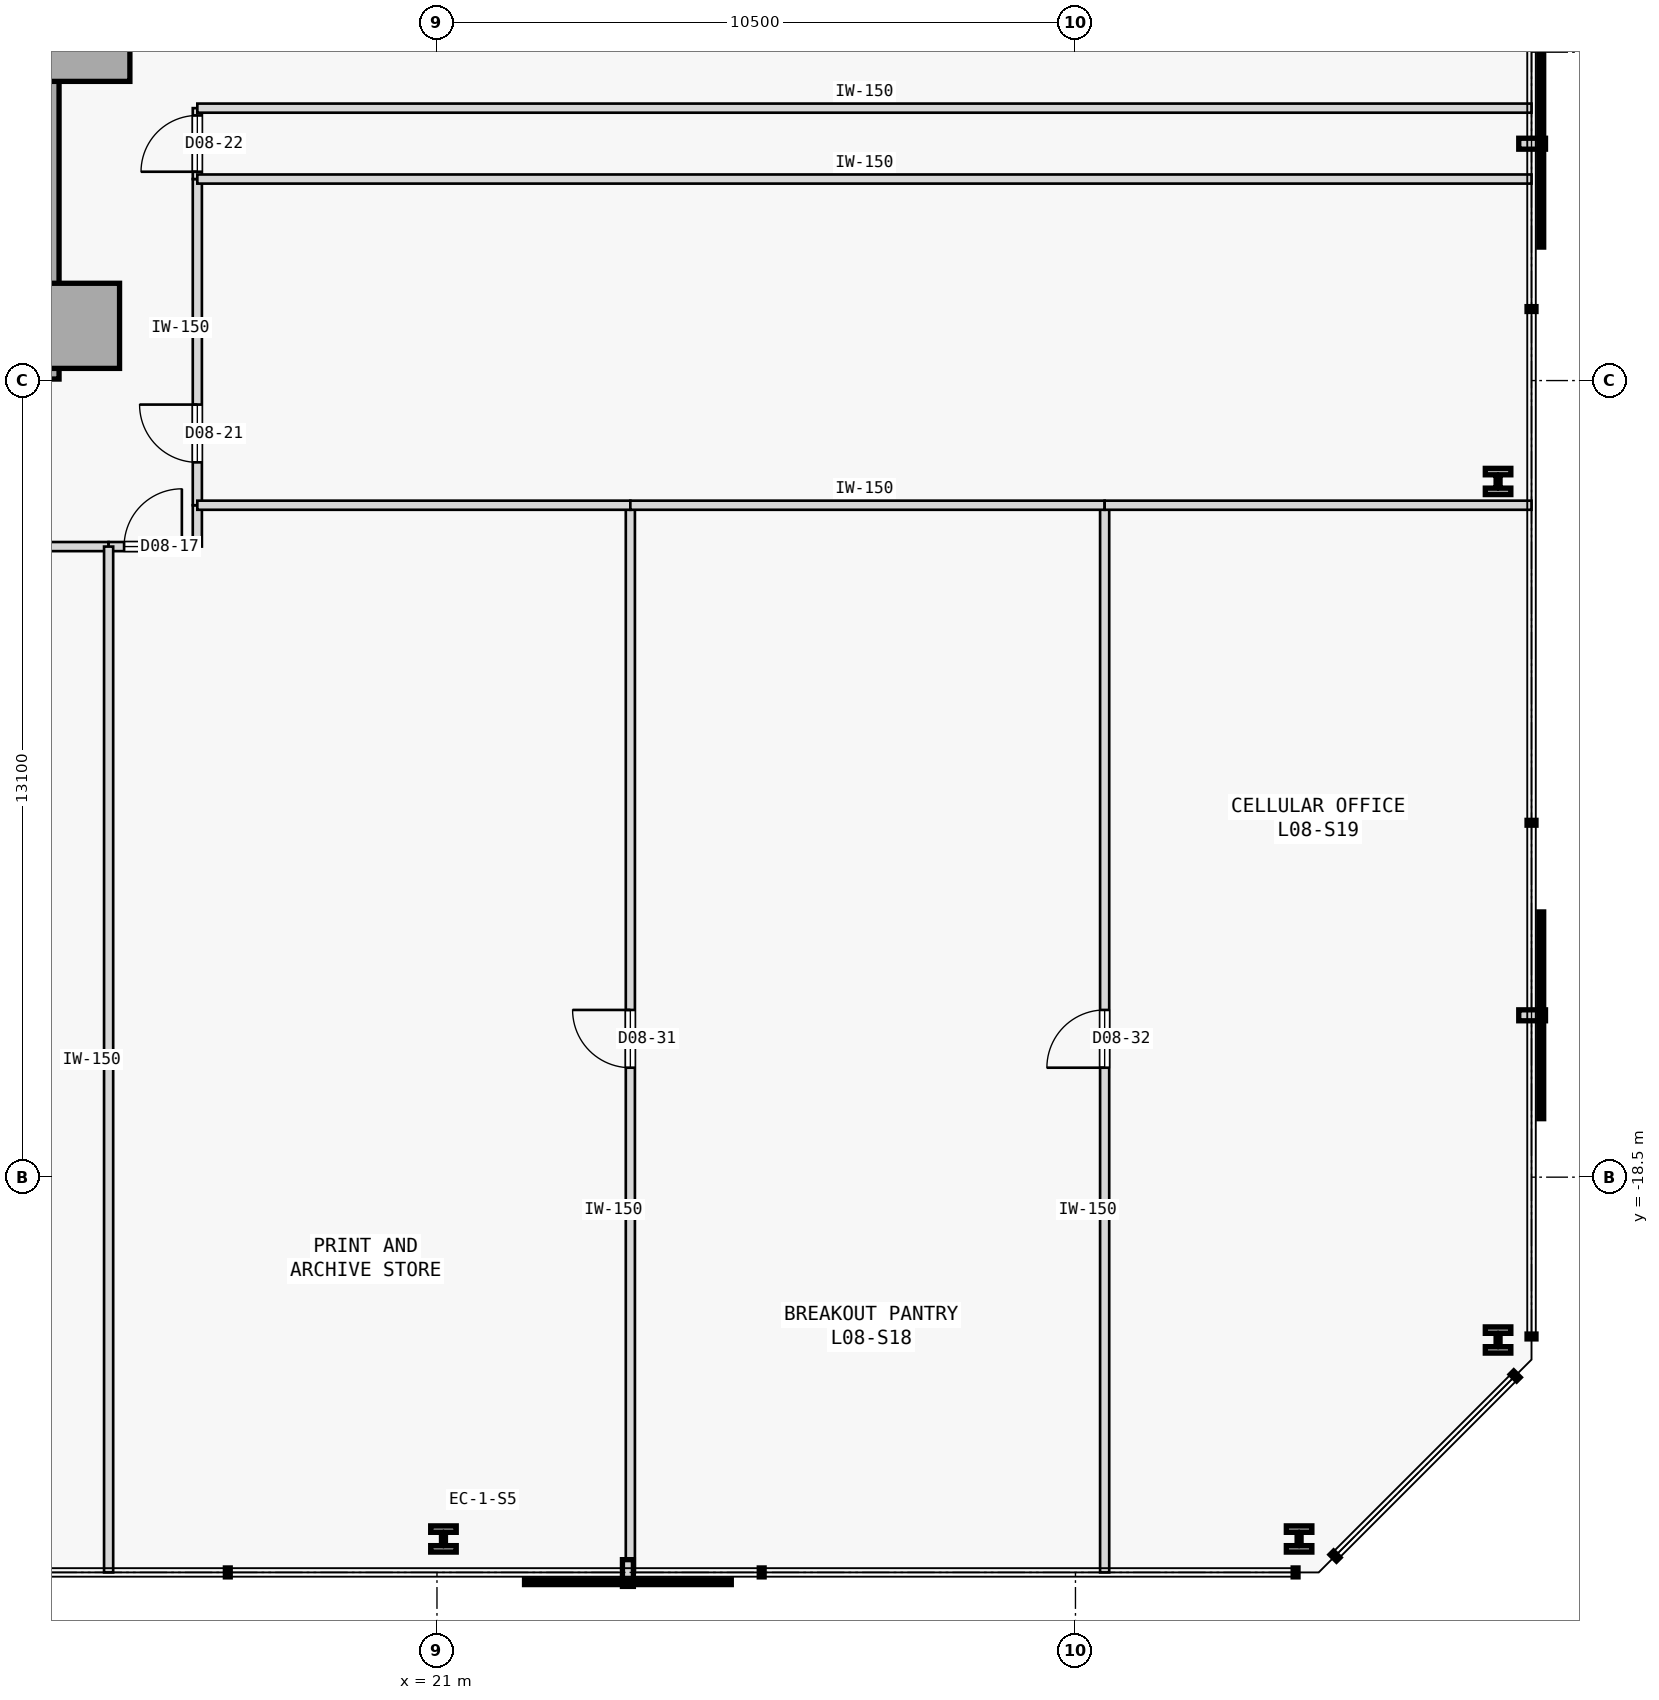
"""IFC4 building model, lengths in metres.
Left out: names, types, materials, properties, quantities, classifications, styles, units other than length and angle.
Written with IfcOpenShell. Run it as: python <this file> out.ifc"""

import sys

from ifc_helpers import new_model, si_unit, direction, frame, frame_2d, origin, origin_2d, place, context, subcontext, project, spatial, rectangle, i_section, extrude, element, fill, save


model = new_model("IFC4")
c1 = context("Model", 3, precision=1e-05, world=origin(), true_north=direction((0.0, 1.0)))
c2 = subcontext(c1, "Body", "Model", "MODEL_VIEW")
j1 = project(units=[si_unit("LENGTHUNIT", "METRE"), si_unit("PLANEANGLEUNIT", "RADIAN")], contexts=[c1])
p1 = place(None, origin())
s1 = spatial("IfcSite", under=j1, at=p1, CompositionType="ELEMENT")
p2 = place(p1, origin())
s2 = spatial("IfcBuilding", under=s1, at=p2, CompositionType="ELEMENT")
p3 = place(p2, frame((0.0, 0.0, 37.0)))
s3 = spatial("IfcBuildingStorey", under=s2, at=p3, CompositionType="ELEMENT", Elevation=37.0)
for number, where, z_axis, x_axis in (
    (1, (15.25, 0.22, 0.0), (0.0, 0.0, 1.0), (1.0, 0.0, 0.0)),
    (2, (15.08, -4.5, 0.0), (0.0, 0.0, 1.0), (1.0, 0.0, 0.0)),
):
    element("IfcColumn", number, at=place(p3, frame(where, z_axis=z_axis, x_axis=x_axis)), inside=s3, PredefinedType="COLUMN", context=c2, shape_type="SweptSolid", body=[
        extrude(rectangle(XDim=1.4, YDim=1.4, at=origin_2d()), origin(), (0.0, 0.0, 1.0), 3.8),
    ])
p4 = place(p3, frame((14.56, -5.375, 0.0), z_axis=(0.0, 0.0, 1.0), x_axis=(0.0, 1.0, 0.0)))
e3 = element("IfcWall", 3, at=p4, inside=s3, PredefinedType="SHEAR", context=c2, shape_type="SweptSolid", body=[
    extrude(rectangle(XDim=10.75, YDim=0.45, at=frame_2d((5.375, 0.0))), origin(), (0.0, 0.0, 1.0), 3.575),
])
for number, where, z_axis, x_axis in (
    (4, (21.107, -24.45, 0.0), (0.0, 0.0, 1.0), (1.0, 0.0, 0.0)),
    (5, (35.178, -24.45, 0.0), (0.0, 0.0, 1.0), (1.0, 0.0, 0.0)),
    (6, (38.45, -21.178, 0.0), (0.0, 0.0, 1.0), (1.0, 0.0, 0.0)),
    (7, (38.45, -7.059, 0.0), (0.0, 0.0, 1.0), (1.0, 0.0, 0.0)),
):
    element("IfcColumn", number, at=place(p3, frame(where, z_axis=z_axis, x_axis=x_axis)), inside=s3, PredefinedType="COLUMN", context=c2, shape_type="SweptSolid", body=[
        extrude(i_section(OverallWidth=0.42, OverallDepth=0.431, WebThickness=0.065, FlangeThickness=0.106, FilletRadius=0.015, at=origin_2d()), origin(), (0.0, 0.0, 1.0), 3.8),
    ])
p5 = place(p3, frame((6.24, -8.13, 0.0), z_axis=(0.0, 0.0, 1.0), x_axis=(1.0, 0.0, 0.0)))
e8 = element("IfcWall", 8, at=p5, inside=s3, PredefinedType="PARTITIONING", context=c2, shape_type="SweptSolid", body=[
    extrude(rectangle(XDim=9.36, YDim=0.15, at=frame_2d((4.68, 0.0))), origin(), (0.0, 0.0, 1.0), 3.575),
])
p6 = place(p5, frame((5.609, 0.0, 0.0)))
e9 = element("IfcOpeningElement", 9, at=p6, cuts=e8, PredefinedType="OPENING", context=c2, shape_type="SweptSolid", body=[
    extrude(rectangle(XDim=0.95, YDim=2.15, at=frame_2d((0.475, 1.075))), frame((0.0, 0.085, 0.0), z_axis=(0.0, -1.0, 0.0), x_axis=(1.0, 0.0, 0.0)), (0.0, 0.0, 1.0), 0.17),
])
p7 = place(p3, frame((15.6, -8.13, 0.0), z_axis=(0.0, 0.0, 1.0), x_axis=(1.0, 0.0, 0.0)))
e10 = element("IfcWall", 10, at=p7, inside=s3, PredefinedType="PARTITIONING", context=c2, shape_type="SweptSolid", body=[
    extrude(rectangle(XDim=1.459, YDim=0.15, at=frame_2d((0.729, 0.0))), origin(), (0.0, 0.0, 1.0), 3.575),
])
p8 = place(p7, frame((0.254, 0.0, 0.0)))
e11 = element("IfcOpeningElement", 11, at=p8, cuts=e10, PredefinedType="OPENING", context=c2, shape_type="SweptSolid", body=[
    extrude(rectangle(XDim=0.95, YDim=2.15, at=frame_2d((0.475, 1.075))), frame((0.0, 0.085, 0.0), z_axis=(0.0, -1.0, 0.0), x_axis=(1.0, 0.0, 0.0)), (0.0, 0.0, 1.0), 0.17),
])
p9 = place(p3, frame((17.059, -8.13, 0.0), z_axis=(0.0, 0.0, 1.0), x_axis=(0.0, 1.0, 0.0)))
e12 = element("IfcWall", 12, at=p9, inside=s3, PredefinedType="PARTITIONING", context=c2, shape_type="SweptSolid", body=[
    extrude(rectangle(XDim=0.68, YDim=0.15, at=frame_2d((0.34, 0.0))), origin(), (0.0, 0.0, 1.0), 3.575),
])
p10 = place(p3, frame((17.059, -7.45, 0.0), z_axis=(0.0, 0.0, 1.0), x_axis=(0.0, 1.0, 0.0)))
e13 = element("IfcWall", 13, at=p10, inside=s3, PredefinedType="PARTITIONING", context=c2, shape_type="SweptSolid", body=[
    extrude(rectangle(XDim=5.364, YDim=0.15, at=frame_2d((2.682, 0.0))), origin(), (0.0, 0.0, 1.0), 3.575),
])
p11 = place(p10, frame((0.705, 0.0, 0.0)))
e14 = element("IfcOpeningElement", 14, at=p11, cuts=e13, PredefinedType="OPENING", context=c2, shape_type="SweptSolid", body=[
    extrude(rectangle(XDim=0.95, YDim=2.15, at=frame_2d((0.475, 1.075))), frame((0.0, 0.085, 0.0), z_axis=(0.0, -1.0, 0.0), x_axis=(1.0, 0.0, 0.0)), (0.0, 0.0, 1.0), 0.17),
])
p12 = place(p3, frame((17.059, -2.086, 0.0), z_axis=(0.0, 0.0, 1.0), x_axis=(0.0, 1.0, 0.0)))
e15 = element("IfcWall", 15, at=p12, inside=s3, PredefinedType="PARTITIONING", context=c2, shape_type="SweptSolid", body=[
    extrude(rectangle(XDim=1.166, YDim=0.15, at=frame_2d((0.583, 0.0))), origin(), (0.0, 0.0, 1.0), 3.575),
])
p13 = place(p12, frame((0.12, 0.0, 0.0)))
e16 = element("IfcOpeningElement", 16, at=p13, cuts=e15, PredefinedType="OPENING", context=c2, shape_type="SweptSolid", body=[
    extrude(rectangle(XDim=0.926, YDim=2.15, at=frame_2d((0.463, 1.075))), frame((0.0, 0.085, 0.0), z_axis=(0.0, -1.0, 0.0), x_axis=(1.0, 0.0, 0.0)), (0.0, 0.0, 1.0), 0.17),
])
p14 = place(p3, frame((17.059, -0.92, 0.0), z_axis=(0.0, 0.0, 1.0), x_axis=(1.0, 0.0, 0.0)))
e17 = element("IfcWall", 17, at=p14, inside=s3, PredefinedType="PARTITIONING", context=c2, shape_type="SweptSolid", body=[
    extrude(rectangle(XDim=21.941, YDim=0.15, at=frame_2d((10.97, 0.0))), origin(), (0.0, 0.0, 1.0), 3.575),
])
p15 = place(p3, frame((15.6, -25.0, 0.0), z_axis=(0.0, 0.0, 1.0), x_axis=(0.0, 1.0, 0.0)))
e18 = element("IfcWall", 18, at=p15, inside=s3, PredefinedType="PARTITIONING", context=c2, shape_type="SweptSolid", body=[
    extrude(rectangle(XDim=16.87, YDim=0.15, at=frame_2d((8.435, 0.0))), origin(), (0.0, 0.0, 1.0), 3.575),
])
p16 = place(p3, frame((24.18, -25.0, 0.0), z_axis=(0.0, 0.0, 1.0), x_axis=(0.0, 1.0, 0.0)))
e19 = element("IfcWall", 19, at=p16, inside=s3, PredefinedType="PARTITIONING", context=c2, shape_type="SweptSolid", body=[
    extrude(rectangle(XDim=17.55, YDim=0.15, at=frame_2d((8.775, 0.0))), origin(), (0.0, 0.0, 1.0), 3.575),
])
p17 = place(p16, frame((8.3, 0.0, 0.0)))
e20 = element("IfcOpeningElement", 20, at=p17, cuts=e19, PredefinedType="OPENING", context=c2, shape_type="SweptSolid", body=[
    extrude(rectangle(XDim=0.95, YDim=2.15, at=frame_2d((0.475, 1.075))), frame((0.0, 0.085, 0.0), z_axis=(0.0, -1.0, 0.0), x_axis=(1.0, 0.0, 0.0)), (0.0, 0.0, 1.0), 0.17),
])
p18 = place(p3, frame((17.059, -7.45, 0.0), z_axis=(0.0, 0.0, 1.0), x_axis=(1.0, 0.0, 0.0)))
e21 = element("IfcWall", 21, at=p18, inside=s3, PredefinedType="PARTITIONING", context=c2, shape_type="SweptSolid", body=[
    extrude(rectangle(XDim=7.121, YDim=0.15, at=frame_2d((3.561, 0.0))), origin(), (0.0, 0.0, 1.0), 3.575),
])
p19 = place(p3, frame((31.98, -25.0, 0.0), z_axis=(0.0, 0.0, 1.0), x_axis=(0.0, 1.0, 0.0)))
e22 = element("IfcWall", 22, at=p19, inside=s3, PredefinedType="PARTITIONING", context=c2, shape_type="SweptSolid", body=[
    extrude(rectangle(XDim=17.55, YDim=0.15, at=frame_2d((8.775, 0.0))), origin(), (0.0, 0.0, 1.0), 3.575),
])
p20 = place(p19, frame((8.3, 0.0, 0.0)))
e23 = element("IfcOpeningElement", 23, at=p20, cuts=e22, PredefinedType="OPENING", context=c2, shape_type="SweptSolid", body=[
    extrude(rectangle(XDim=0.95, YDim=2.15, at=frame_2d((0.475, 1.075))), frame((0.0, 0.085, 0.0), z_axis=(0.0, -1.0, 0.0), x_axis=(1.0, 0.0, 0.0)), (0.0, 0.0, 1.0), 0.17),
])
p21 = place(p3, frame((24.18, -7.45, 0.0), z_axis=(0.0, 0.0, 1.0), x_axis=(1.0, 0.0, 0.0)))
e24 = element("IfcWall", 24, at=p21, inside=s3, PredefinedType="PARTITIONING", context=c2, shape_type="SweptSolid", body=[
    extrude(rectangle(XDim=7.8, YDim=0.15, at=frame_2d((3.9, 0.0))), origin(), (0.0, 0.0, 1.0), 3.575),
])
p22 = place(p3, frame((31.98, -7.45, 0.0), z_axis=(0.0, 0.0, 1.0), x_axis=(1.0, 0.0, 0.0)))
e25 = element("IfcWall", 25, at=p22, inside=s3, PredefinedType="PARTITIONING", context=c2, shape_type="SweptSolid", body=[
    extrude(rectangle(XDim=7.02, YDim=0.15, at=frame_2d((3.51, 0.0))), origin(), (0.0, 0.0, 1.0), 3.575),
])
p23 = place(p3, frame((17.059, -2.086, 0.0), z_axis=(0.0, 0.0, 1.0), x_axis=(1.0, 0.0, 0.0)))
e26 = element("IfcWall", 26, at=p23, inside=s3, PredefinedType="PARTITIONING", context=c2, shape_type="SweptSolid", body=[
    extrude(rectangle(XDim=21.941, YDim=0.15, at=frame_2d((10.97, 0.0))), origin(), (0.0, 0.0, 1.0), 3.575),
])
p24 = place(p8, origin())
e27 = element("IfcDoor", 27, at=p24, inside=s3, OperationType="SINGLE_SWING_RIGHT", PredefinedType="DOOR", context=c2, shape_type="SweptSolid", body=[
    extrude(rectangle(XDim=0.95, YDim=2.15, at=frame_2d((0.475, 1.075))), frame((0.0, 0.025, 0.0), z_axis=(0.0, -1.0, 0.0), x_axis=(1.0, 0.0, 0.0)), (0.0, 0.0, 1.0), 0.05),
])
fill(e11, e27)
p25 = place(p11, origin())
e28 = element("IfcDoor", 28, at=p25, inside=s3, OperationType="SINGLE_SWING_RIGHT", PredefinedType="DOOR", context=c2, shape_type="SweptSolid", body=[
    extrude(rectangle(XDim=0.95, YDim=2.15, at=frame_2d((0.475, 1.075))), frame((0.0, 0.025, 0.0), z_axis=(0.0, -1.0, 0.0), x_axis=(1.0, 0.0, 0.0)), (0.0, 0.0, 1.0), 0.05),
])
fill(e14, e28)
p26 = place(p13, origin())
e29 = element("IfcDoor", 29, at=p26, inside=s3, OperationType="SINGLE_SWING_LEFT", PredefinedType="DOOR", context=c2, shape_type="SweptSolid", body=[
    extrude(rectangle(XDim=0.926, YDim=2.15, at=frame_2d((0.463, 1.075))), frame((0.0, 0.025, 0.0), z_axis=(0.0, -1.0, 0.0), x_axis=(1.0, 0.0, 0.0)), (0.0, 0.0, 1.0), 0.05),
])
fill(e16, e29)
p27 = place(p17, origin())
e30 = element("IfcDoor", 30, at=p27, inside=s3, OperationType="SINGLE_SWING_RIGHT", PredefinedType="DOOR", context=c2, shape_type="SweptSolid", body=[
    extrude(rectangle(XDim=0.95, YDim=2.15, at=frame_2d((0.475, 1.075))), frame((0.0, 0.025, 0.0), z_axis=(0.0, -1.0, 0.0), x_axis=(1.0, 0.0, 0.0)), (0.0, 0.0, 1.0), 0.05),
])
fill(e20, e30)
p28 = place(p20, origin())
e31 = element("IfcDoor", 31, at=p28, inside=s3, OperationType="SINGLE_SWING_LEFT", PredefinedType="DOOR", context=c2, shape_type="SweptSolid", body=[
    extrude(rectangle(XDim=0.95, YDim=2.15, at=frame_2d((0.475, 1.075))), frame((0.0, 0.025, 0.0), z_axis=(0.0, -1.0, 0.0), x_axis=(1.0, 0.0, 0.0)), (0.0, 0.0, 1.0), 0.05),
])
fill(e23, e31)
save(model, sys.argv[1])
